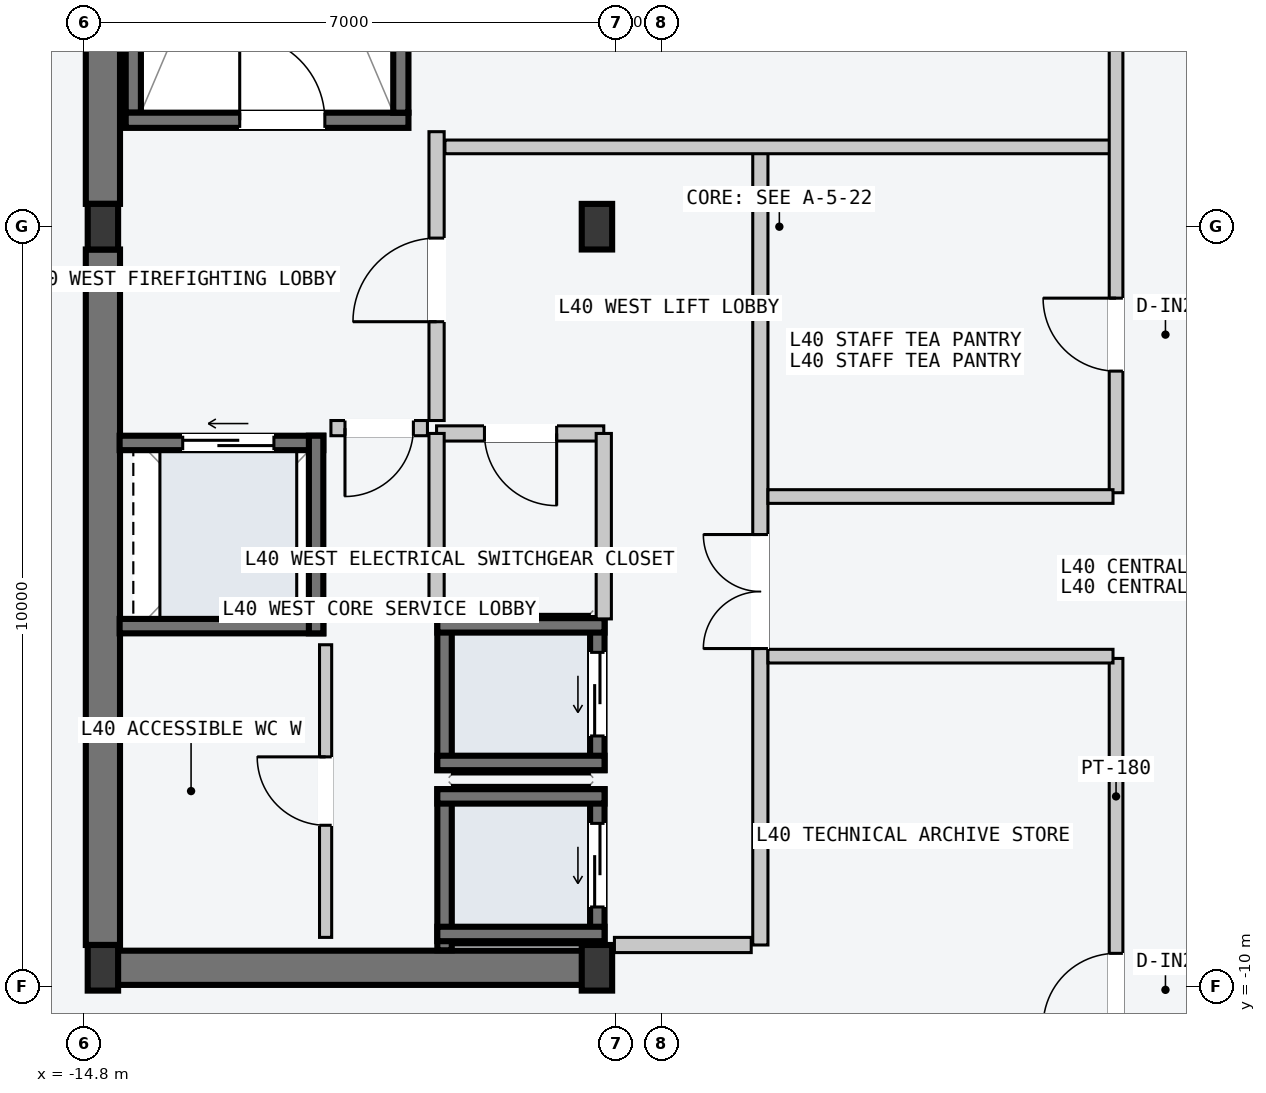
"""IFC4 building model, lengths in metres.
Left out: names, types, materials, properties, quantities, classifications, styles, units other than length and angle.
Written with IfcOpenShell. Run it as: python <this file> out.ifc"""

import sys

from ifc_helpers import new_model, si_unit, direction, frame, frame_2d, origin, origin_2d, place, context, subcontext, project, spatial, rectangle, i_section, extrude, element, fill, save


model = new_model("IFC4")
c1 = context("Model", 3, precision=1e-05, world=origin(), true_north=direction((0.0, 1.0)))
c2 = subcontext(c1, "Body", "Model", "MODEL_VIEW")
j1 = project(units=[si_unit("LENGTHUNIT", "METRE"), si_unit("PLANEANGLEUNIT", "RADIAN")], contexts=[c1])
p1 = place(None, origin())
s1 = spatial("IfcSite", under=j1, at=p1, CompositionType="ELEMENT")
p2 = place(p1, origin())
s2 = spatial("IfcBuilding", under=s1, at=p2, CompositionType="ELEMENT")
p3 = place(p2, frame((0.0, 0.0, 155.1)))
s3 = spatial("IfcBuildingStorey", under=s2, at=p3, CompositionType="ELEMENT", Elevation=155.1)
p4 = place(p3, frame((-14.53, -9.75, -0.2), z_axis=(0.0, 0.0, 1.0), x_axis=(1.0, 0.0, 0.0)))
e1 = element("IfcWall", 1, at=p4, inside=s3, PredefinedType="SHEAR", context=c2, shape_type="SweptSolid", body=[
    extrude(rectangle(XDim=6.46, YDim=0.45, at=frame_2d((3.23, 0.0))), origin(), (0.0, 0.0, 1.0), 3.6),
])
for number, where, z_axis, x_axis in (
    (2, (-14.55, -9.45, -0.2), (0.0, 0.0, 1.0), (0.0, 1.0, 0.0)),
    (3, (-14.55, 0.3, -0.2), (0.0, 0.0, 1.0), (0.0, 1.0, 0.0)),
):
    element("IfcWall", number, at=place(p3, frame(where, z_axis=z_axis, x_axis=x_axis)), inside=s3, PredefinedType="SHEAR", context=c2, shape_type="SweptSolid", body=[
        extrude(rectangle(XDim=9.15, YDim=0.45, at=frame_2d((4.575, 0.0))), origin(), (0.0, 0.0, 1.0), 3.6),
    ])
p5 = place(p3, frame((-14.15, 1.5, -0.2), z_axis=(0.0, 0.0, 1.0), x_axis=(0.0, 1.0, 0.0)))
e4 = element("IfcWall", 4, at=p5, inside=s3, PredefinedType="SOLIDWALL", context=c2, shape_type="SweptSolid", body=[
    extrude(rectangle(XDim=7.8, YDim=0.2, at=frame_2d((3.9, 0.0))), origin(), (0.0, 0.0, 1.0), 3.6),
])
p6 = place(p3, frame((-14.25, 1.4, -0.2), z_axis=(0.0, 0.0, 1.0), x_axis=(1.0, 0.0, 0.0)))
e5 = element("IfcWall", 5, at=p6, inside=s3, PredefinedType="SOLIDWALL", context=c2, shape_type="SweptSolid", body=[
    extrude(rectangle(XDim=3.72, YDim=0.2, at=frame_2d((1.86, 0.0))), origin(), (0.0, 0.0, 1.0), 3.6),
])
p7 = place(p6, frame((1.5, 0.0, 0.2)))
e6 = element("IfcOpeningElement", 6, at=p7, cuts=e5, PredefinedType="OPENING", context=c2, shape_type="SweptSolid", body=[
    extrude(rectangle(XDim=1.12, YDim=2.18, at=frame_2d((0.56, 1.09))), frame((0.0, 0.11, 0.0), z_axis=(0.0, -1.0, 0.0), x_axis=(1.0, 0.0, 0.0)), (0.0, 0.0, 1.0), 0.22),
])
p8 = place(p3, frame((-10.63, 1.5, -0.2), z_axis=(0.0, 0.0, 1.0), x_axis=(0.0, 1.0, 0.0)))
e7 = element("IfcWall", 7, at=p8, inside=s3, PredefinedType="SOLIDWALL", context=c2, shape_type="SweptSolid", body=[
    extrude(rectangle(XDim=7.8, YDim=0.2, at=frame_2d((3.9, 0.0))), origin(), (0.0, 0.0, 1.0), 3.6),
])
for number, where, z_axis, x_axis in (
    (8, (-14.55, -9.75, 0.0), (0.0, 0.0, 1.0), (1.0, 0.0, 0.0)),
    (9, (-14.55, 0.0, 0.0), (0.0, 0.0, 1.0), (1.0, 0.0, 0.0)),
    (10, (-8.05, -9.75, 0.0), (0.0, 0.0, 1.0), (1.0, 0.0, 0.0)),
    (11, (-8.05, 0.0, 0.0), (0.0, 0.0, 1.0), (1.0, 0.0, 0.0)),
):
    element("IfcColumn", number, at=place(p3, frame(where, z_axis=z_axis, x_axis=x_axis)), inside=s3, PredefinedType="COLUMN", context=c2, shape_type="SweptSolid", body=[
        extrude(i_section(OverallWidth=0.4, OverallDepth=0.6, WebThickness=0.022, FlangeThickness=0.036, at=origin_2d()), origin(), (0.0, 0.0, 1.0), 3.6),
    ])
p9 = place(p3, frame((-8.045, -9.52, -0.2), z_axis=(0.0, 0.0, 1.0), x_axis=(0.0, 1.0, 0.0)))
e12 = element("IfcWall", 12, at=p9, inside=s3, PredefinedType="SOLIDWALL", context=c2, shape_type="SweptSolid", body=[
    extrude(rectangle(XDim=2.12, YDim=0.19, at=frame_2d((1.06, 0.0))), origin(), (0.0, 0.0, 1.0), 3.6),
])
p10 = place(p9, frame((0.57, 0.0, 0.2)))
e13 = element("IfcOpeningElement", 13, at=p10, cuts=e12, PredefinedType="OPENING", context=c2, shape_type="SweptSolid", body=[
    extrude(rectangle(XDim=1.1, YDim=2.2, at=frame_2d((0.55, 1.1))), frame((0.0, 0.105, 0.0), z_axis=(0.0, -1.0, 0.0), x_axis=(1.0, 0.0, 0.0)), (0.0, 0.0, 1.0), 0.21),
])
p11 = place(p3, frame((-10.055, -9.52, -0.2), z_axis=(0.0, 0.0, 1.0), x_axis=(0.0, 1.0, 0.0)))
e14 = element("IfcWall", 14, at=p11, inside=s3, PredefinedType="SOLIDWALL", context=c2, shape_type="SweptSolid", body=[
    extrude(rectangle(XDim=2.12, YDim=0.19, at=frame_2d((1.06, 0.0))), origin(), (0.0, 0.0, 1.0), 3.6),
])
for number, where, z_axis, x_axis in (
    (15, (-10.15, -7.495, -0.2), (0.0, 0.0, 1.0), (1.0, 0.0, 0.0)),
    (16, (-10.15, -9.305, -0.2), (0.0, 0.0, 1.0), (1.0, 0.0, 0.0)),
):
    element("IfcWall", number, at=place(p3, frame(where, z_axis=z_axis, x_axis=x_axis)), inside=s3, PredefinedType="SOLIDWALL", context=c2, shape_type="SweptSolid", body=[
        extrude(rectangle(XDim=2.2, YDim=0.19, at=frame_2d((1.1, 0.0))), origin(), (0.0, 0.0, 1.0), 3.6),
    ])
p12 = place(p3, frame((-8.045, -7.15, -0.2), z_axis=(0.0, 0.0, 1.0), x_axis=(0.0, 1.0, 0.0)))
e17 = element("IfcWall", 17, at=p12, inside=s3, PredefinedType="SOLIDWALL", context=c2, shape_type="SweptSolid", body=[
    extrude(rectangle(XDim=2.0, YDim=0.19, at=frame_2d((1.0, 0.0))), origin(), (0.0, 0.0, 1.0), 3.6),
])
p13 = place(p12, frame((0.45, 0.0, 0.2)))
e18 = element("IfcOpeningElement", 18, at=p13, cuts=e17, PredefinedType="OPENING", context=c2, shape_type="SweptSolid", body=[
    extrude(rectangle(XDim=1.1, YDim=2.2, at=frame_2d((0.55, 1.1))), frame((0.0, 0.105, 0.0), z_axis=(0.0, -1.0, 0.0), x_axis=(1.0, 0.0, 0.0)), (0.0, 0.0, 1.0), 0.21),
])
p14 = place(p3, frame((-10.055, -7.15, -0.2), z_axis=(0.0, 0.0, 1.0), x_axis=(0.0, 1.0, 0.0)))
e19 = element("IfcWall", 19, at=p14, inside=s3, PredefinedType="SOLIDWALL", context=c2, shape_type="SweptSolid", body=[
    extrude(rectangle(XDim=2.0, YDim=0.19, at=frame_2d((1.0, 0.0))), origin(), (0.0, 0.0, 1.0), 3.6),
])
for number, where, z_axis, x_axis in (
    (20, (-10.15, -5.245, -0.2), (0.0, 0.0, 1.0), (1.0, 0.0, 0.0)),
    (21, (-10.15, -7.055, -0.2), (0.0, 0.0, 1.0), (1.0, 0.0, 0.0)),
):
    element("IfcWall", number, at=place(p3, frame(where, z_axis=z_axis, x_axis=x_axis)), inside=s3, PredefinedType="SOLIDWALL", context=c2, shape_type="SweptSolid", body=[
        extrude(rectangle(XDim=2.2, YDim=0.19, at=frame_2d((1.1, 0.0))), origin(), (0.0, 0.0, 1.0), 3.6),
    ])
p15 = place(p3, frame((-14.33, -2.845, -0.2), z_axis=(0.0, 0.0, 1.0), x_axis=(1.0, 0.0, 0.0)))
e22 = element("IfcWall", 22, at=p15, inside=s3, PredefinedType="SOLIDWALL", context=c2, shape_type="SweptSolid", body=[
    extrude(rectangle(XDim=2.68, YDim=0.19, at=frame_2d((1.34, 0.0))), origin(), (0.0, 0.0, 1.0), 3.6),
])
p16 = place(p15, frame((0.83, 0.0, 0.2)))
e23 = element("IfcOpeningElement", 23, at=p16, cuts=e22, PredefinedType="OPENING", context=c2, shape_type="SweptSolid", body=[
    extrude(rectangle(XDim=1.2, YDim=2.2, at=frame_2d((0.6, 1.1))), frame((0.0, 0.105, 0.0), z_axis=(0.0, -1.0, 0.0), x_axis=(1.0, 0.0, 0.0)), (0.0, 0.0, 1.0), 0.21),
])
p17 = place(p3, frame((-14.33, -5.255, -0.2), z_axis=(0.0, 0.0, 1.0), x_axis=(1.0, 0.0, 0.0)))
e24 = element("IfcWall", 24, at=p17, inside=s3, PredefinedType="SOLIDWALL", context=c2, shape_type="SweptSolid", body=[
    extrude(rectangle(XDim=2.68, YDim=0.19, at=frame_2d((1.34, 0.0))), origin(), (0.0, 0.0, 1.0), 3.6),
])
p18 = place(p3, frame((-11.745, -5.35, -0.2), z_axis=(0.0, 0.0, 1.0), x_axis=(0.0, 1.0, 0.0)))
e25 = element("IfcWall", 25, at=p18, inside=s3, PredefinedType="SOLIDWALL", context=c2, shape_type="SweptSolid", body=[
    extrude(rectangle(XDim=2.6, YDim=0.19, at=frame_2d((1.3, 0.0))), origin(), (0.0, 0.0, 1.0), 3.6),
])
p19 = place(p3, frame((-5.9, -9.45, 0.0), z_axis=(0.0, 0.0, 1.0), x_axis=(0.0, 1.0, 0.0)))
e26 = element("IfcWall", 26, at=p19, inside=s3, PredefinedType="PARTITIONING", context=c2, shape_type="SweptSolid", body=[
    extrude(rectangle(XDim=10.5, YDim=0.2, at=frame_2d((5.25, 0.0))), origin(), (0.0, 0.0, 1.0), 3.4),
])
p20 = place(p19, frame((3.9, 0.0, 0.0)))
e27 = element("IfcOpeningElement", 27, at=p20, cuts=e26, PredefinedType="OPENING", context=c2, shape_type="SweptSolid", body=[
    extrude(rectangle(XDim=1.5, YDim=2.2, at=frame_2d((0.75, 1.1))), frame((0.0, 0.11, 0.0), z_axis=(0.0, -1.0, 0.0), x_axis=(1.0, 0.0, 0.0)), (0.0, 0.0, 1.0), 0.22),
])
p21 = place(p3, frame((-6.02, -9.45, 0.0), z_axis=(0.0, 0.0, 1.0), x_axis=(-1.0, 0.0, 0.0)))
e28 = element("IfcWall", 28, at=p21, inside=s3, PredefinedType="PARTITIONING", context=c2, shape_type="SweptSolid", body=[
    extrude(rectangle(XDim=1.8, YDim=0.2, at=frame_2d((0.9, 0.0))), origin(), (0.0, 0.0, 1.0), 3.4),
])
p22 = place(p3, frame((-10.16, -2.55, 0.0), z_axis=(0.0, 0.0, 1.0), x_axis=(0.0, 1.0, 0.0)))
e29 = element("IfcWall", 29, at=p22, inside=s3, PredefinedType="PARTITIONING", context=c2, shape_type="SweptSolid", body=[
    extrude(rectangle(XDim=3.8, YDim=0.2, at=frame_2d((1.9, 0.0))), origin(), (0.0, 0.0, 1.0), 3.4),
])
p23 = place(p22, frame((1.3, 0.0, 0.0)))
e30 = element("IfcOpeningElement", 30, at=p23, cuts=e29, PredefinedType="OPENING", context=c2, shape_type="SweptSolid", body=[
    extrude(rectangle(XDim=1.1, YDim=2.15, at=frame_2d((0.55, 1.075))), frame((0.0, 0.11, 0.0), z_axis=(0.0, -1.0, 0.0), x_axis=(1.0, 0.0, 0.0)), (0.0, 0.0, 1.0), 0.22),
])
p24 = place(p3, frame((-10.28, -2.65, 0.0), z_axis=(0.0, 0.0, 1.0), x_axis=(-1.0, 0.0, 0.0)))
e31 = element("IfcWall", 31, at=p24, inside=s3, PredefinedType="PARTITIONING", context=c2, shape_type="SweptSolid", body=[
    extrude(rectangle(XDim=1.27, YDim=0.2, at=frame_2d((0.635, 0.0))), origin(), (0.0, 0.0, 1.0), 3.4),
])
p25 = place(p24, frame((0.185, 0.0, 0.0)))
e32 = element("IfcOpeningElement", 32, at=p25, cuts=e31, PredefinedType="OPENING", context=c2, shape_type="SweptSolid", body=[
    extrude(rectangle(XDim=0.9, YDim=2.15, at=frame_2d((0.45, 1.075))), frame((0.0, 0.11, 0.0), z_axis=(0.0, -1.0, 0.0), x_axis=(1.0, 0.0, 0.0)), (0.0, 0.0, 1.0), 0.22),
])
p26 = place(p3, frame((-7.96, -2.72, 0.0), z_axis=(0.0, 0.0, 1.0), x_axis=(-1.0, 0.0, 0.0)))
e33 = element("IfcWall", 33, at=p26, inside=s3, PredefinedType="PARTITIONING", context=c2, shape_type="SweptSolid", body=[
    extrude(rectangle(XDim=2.2, YDim=0.2, at=frame_2d((1.1, 0.0))), origin(), (0.0, 0.0, 1.0), 3.4),
])
p27 = place(p26, frame((0.62, 0.0, 0.0)))
e34 = element("IfcOpeningElement", 34, at=p27, cuts=e33, PredefinedType="OPENING", context=c2, shape_type="SweptSolid", body=[
    extrude(rectangle(XDim=0.95, YDim=2.1, at=frame_2d((0.475, 1.05))), frame((0.0, 0.11, 0.0), z_axis=(0.0, -1.0, 0.0), x_axis=(1.0, 0.0, 0.0)), (0.0, 0.0, 1.0), 0.22),
])
for number, where, z_axis, x_axis in (
    (35, (-7.96, -5.16, 0.0), (0.0, 0.0, 1.0), (0.0, 1.0, 0.0)),
    (36, (-10.16, -5.16, 0.0), (0.0, 0.0, 1.0), (0.0, 1.0, 0.0)),
):
    element("IfcWall", number, at=place(p3, frame(where, z_axis=z_axis, x_axis=x_axis)), inside=s3, PredefinedType="PARTITIONING", context=c2, shape_type="SweptSolid", body=[
        extrude(rectangle(XDim=2.44, YDim=0.2, at=frame_2d((1.22, 0.0))), origin(), (0.0, 0.0, 1.0), 3.4),
    ])
p28 = place(p3, frame((-11.62, -9.35, 0.0), z_axis=(0.0, 0.0, 1.0), x_axis=(0.0, 1.0, 0.0)))
e37 = element("IfcWall", 37, at=p28, inside=s3, PredefinedType="PARTITIONING", context=c2, shape_type="SweptSolid", body=[
    extrude(rectangle(XDim=3.85, YDim=0.16, at=frame_2d((1.925, 0.0))), origin(), (0.0, 0.0, 1.0), 3.4),
])
p29 = place(p28, frame((1.475, 0.0, 0.0)))
e38 = element("IfcOpeningElement", 38, at=p29, cuts=e37, PredefinedType="OPENING", context=c2, shape_type="SweptSolid", body=[
    extrude(rectangle(XDim=0.9, YDim=2.15, at=frame_2d((0.45, 1.075))), frame((0.0, 0.09, 0.0), z_axis=(0.0, -1.0, 0.0), x_axis=(1.0, 0.0, 0.0)), (0.0, 0.0, 1.0), 0.18),
])
p30 = place(p3, frame((-10.05, 1.05, 0.0), z_axis=(0.0, 0.0, 1.0), x_axis=(1.0, 0.0, 0.0)))
e39 = element("IfcWall", 39, at=p30, inside=s3, PredefinedType="PARTITIONING", context=c2, shape_type="SweptSolid", body=[
    extrude(rectangle(XDim=8.79, YDim=0.18, at=frame_2d((4.395, 0.0))), origin(), (0.0, 0.0, 1.0), 3.4),
])
p31 = place(p3, frame((-1.22, -3.5, 0.0), z_axis=(0.0, 0.0, 1.0), x_axis=(0.0, 1.0, 0.0)))
e40 = element("IfcWall", 40, at=p31, inside=s3, PredefinedType="PARTITIONING", context=c2, shape_type="SweptSolid", body=[
    extrude(rectangle(XDim=13.51, YDim=0.18, at=frame_2d((6.755, 0.0))), origin(), (0.0, 0.0, 1.0), 3.4),
])
p32 = place(p31, frame((6.1, 0.0, 0.0)))
e41 = element("IfcOpeningElement", 41, at=p32, cuts=e40, PredefinedType="OPENING", context=c2, shape_type="SweptSolid", body=[
    extrude(rectangle(XDim=1.24, YDim=2.24, at=frame_2d((0.62, 1.12))), frame((0.0, 0.1, 0.0), z_axis=(0.0, -1.0, 0.0), x_axis=(1.0, 0.0, 0.0)), (0.0, 0.0, 1.0), 0.2),
])
p33 = place(p31, frame((1.6, 0.0, 0.0)))
e42 = element("IfcOpeningElement", 42, at=p33, cuts=e40, PredefinedType="OPENING", context=c2, shape_type="SweptSolid", body=[
    extrude(rectangle(XDim=0.96, YDim=2.18, at=frame_2d((0.48, 1.09))), frame((0.0, 0.1, 0.0), z_axis=(0.0, -1.0, 0.0), x_axis=(1.0, 0.0, 0.0)), (0.0, 0.0, 1.0), 0.2),
])
p34 = place(p3, frame((-5.8, -3.55, 0.0), z_axis=(0.0, 0.0, 1.0), x_axis=(1.0, 0.0, 0.0)))
e43 = element("IfcWall", 43, at=p34, inside=s3, PredefinedType="PARTITIONING", context=c2, shape_type="SweptSolid", body=[
    extrude(rectangle(XDim=4.54, YDim=0.18, at=frame_2d((2.27, 0.0))), origin(), (0.0, 0.0, 1.0), 3.4),
])
p35 = place(p3, frame((-1.22, -11.67, 0.0), z_axis=(0.0, 0.0, 1.0), x_axis=(0.0, 1.0, 0.0)))
e44 = element("IfcWall", 44, at=p35, inside=s3, PredefinedType="PARTITIONING", context=c2, shape_type="SweptSolid", body=[
    extrude(rectangle(XDim=5.99, YDim=0.18, at=frame_2d((2.995, 0.0))), origin(), (0.0, 0.0, 1.0), 3.4),
])
p36 = place(p35, frame((1.15, 0.0, 0.0)))
e45 = element("IfcOpeningElement", 45, at=p36, cuts=e44, PredefinedType="OPENING", context=c2, shape_type="SweptSolid", body=[
    extrude(rectangle(XDim=0.96, YDim=2.18, at=frame_2d((0.48, 1.09))), frame((0.0, 0.1, 0.0), z_axis=(0.0, -1.0, 0.0), x_axis=(1.0, 0.0, 0.0)), (0.0, 0.0, 1.0), 0.2),
])
p37 = place(p3, frame((-5.8, -5.65, 0.0), z_axis=(0.0, 0.0, 1.0), x_axis=(1.0, 0.0, 0.0)))
e46 = element("IfcWall", 46, at=p37, inside=s3, PredefinedType="PARTITIONING", context=c2, shape_type="SweptSolid", body=[
    extrude(rectangle(XDim=4.54, YDim=0.18, at=frame_2d((2.27, 0.0))), origin(), (0.0, 0.0, 1.0), 3.4),
])
p38 = place(p7, origin())
e47 = element("IfcDoor", 47, at=p38, inside=s3, OperationType="SINGLE_SWING_LEFT", PredefinedType="DOOR", context=c2, shape_type="SweptSolid", body=[
    extrude(rectangle(XDim=1.12, YDim=2.18, at=frame_2d((0.56, 1.09))), frame((0.0, 0.025, 0.0), z_axis=(0.0, -1.0, 0.0), x_axis=(1.0, 0.0, 0.0)), (0.0, 0.0, 1.0), 0.05),
])
fill(e6, e47)
p39 = place(p10, origin())
e48 = element("IfcDoor", 48, at=p39, inside=s3, OperationType="SLIDING_TO_LEFT", PredefinedType="DOOR", context=c2, shape_type="SweptSolid", body=[
    extrude(rectangle(XDim=1.1, YDim=2.2, at=frame_2d((0.55, 1.1))), frame((0.0, 0.025, 0.0), z_axis=(0.0, -1.0, 0.0), x_axis=(1.0, 0.0, 0.0)), (0.0, 0.0, 1.0), 0.05),
])
fill(e13, e48)
p40 = place(p13, origin())
e49 = element("IfcDoor", 49, at=p40, inside=s3, OperationType="SLIDING_TO_LEFT", PredefinedType="DOOR", context=c2, shape_type="SweptSolid", body=[
    extrude(rectangle(XDim=1.1, YDim=2.2, at=frame_2d((0.55, 1.1))), frame((0.0, 0.025, 0.0), z_axis=(0.0, -1.0, 0.0), x_axis=(1.0, 0.0, 0.0)), (0.0, 0.0, 1.0), 0.05),
])
fill(e18, e49)
p41 = place(p16, origin())
e50 = element("IfcDoor", 50, at=p41, inside=s3, OperationType="SLIDING_TO_LEFT", PredefinedType="DOOR", context=c2, shape_type="SweptSolid", body=[
    extrude(rectangle(XDim=1.2, YDim=2.2, at=frame_2d((0.6, 1.1))), frame((0.0, 0.025, 0.0), z_axis=(0.0, -1.0, 0.0), x_axis=(1.0, 0.0, 0.0)), (0.0, 0.0, 1.0), 0.05),
])
fill(e23, e50)
p42 = place(p20, origin())
e51 = element("IfcDoor", 51, at=p42, inside=s3, OperationType="DOUBLE_DOOR_SINGLE_SWING", PredefinedType="DOOR", context=c2, shape_type="SweptSolid", body=[
    extrude(rectangle(XDim=1.5, YDim=2.2, at=frame_2d((0.75, 1.1))), frame((0.0, 0.025, 0.0), z_axis=(0.0, -1.0, 0.0), x_axis=(1.0, 0.0, 0.0)), (0.0, 0.0, 1.0), 0.05),
])
fill(e27, e51)
p43 = place(p23, origin())
e52 = element("IfcDoor", 52, at=p43, inside=s3, OperationType="SINGLE_SWING_LEFT", PredefinedType="DOOR", context=c2, shape_type="SweptSolid", body=[
    extrude(rectangle(XDim=1.1, YDim=2.15, at=frame_2d((0.55, 1.075))), frame((0.0, 0.025, 0.0), z_axis=(0.0, -1.0, 0.0), x_axis=(1.0, 0.0, 0.0)), (0.0, 0.0, 1.0), 0.05),
])
fill(e30, e52)
p44 = place(p25, origin())
e53 = element("IfcDoor", 53, at=p44, inside=s3, OperationType="SINGLE_SWING_RIGHT", PredefinedType="DOOR", context=c2, shape_type="SweptSolid", body=[
    extrude(rectangle(XDim=0.9, YDim=2.15, at=frame_2d((0.45, 1.075))), frame((0.0, 0.025, 0.0), z_axis=(0.0, -1.0, 0.0), x_axis=(1.0, 0.0, 0.0)), (0.0, 0.0, 1.0), 0.05),
])
fill(e32, e53)
p45 = place(p27, origin())
e54 = element("IfcDoor", 54, at=p45, inside=s3, OperationType="SINGLE_SWING_LEFT", PredefinedType="DOOR", context=c2, shape_type="SweptSolid", body=[
    extrude(rectangle(XDim=0.95, YDim=2.1, at=frame_2d((0.475, 1.05))), frame((0.0, 0.025, 0.0), z_axis=(0.0, -1.0, 0.0), x_axis=(1.0, 0.0, 0.0)), (0.0, 0.0, 1.0), 0.05),
])
fill(e34, e54)
p46 = place(p29, origin())
e55 = element("IfcDoor", 55, at=p46, inside=s3, OperationType="SINGLE_SWING_RIGHT", PredefinedType="DOOR", context=c2, shape_type="SweptSolid", body=[
    extrude(rectangle(XDim=0.9, YDim=2.15, at=frame_2d((0.45, 1.075))), frame((0.0, 0.025, 0.0), z_axis=(0.0, -1.0, 0.0), x_axis=(1.0, 0.0, 0.0)), (0.0, 0.0, 1.0), 0.05),
])
fill(e38, e55)
p47 = place(p33, origin())
e56 = element("IfcDoor", 56, at=p47, inside=s3, OperationType="SINGLE_SWING_RIGHT", PredefinedType="DOOR", context=c2, shape_type="SweptSolid", body=[
    extrude(rectangle(XDim=0.96, YDim=2.18, at=frame_2d((0.48, 1.09))), frame((0.0, 0.025, 0.0), z_axis=(0.0, -1.0, 0.0), x_axis=(1.0, 0.0, 0.0)), (0.0, 0.0, 1.0), 0.05),
])
fill(e42, e56)
p48 = place(p36, origin())
e57 = element("IfcDoor", 57, at=p48, inside=s3, OperationType="SINGLE_SWING_LEFT", PredefinedType="DOOR", context=c2, shape_type="SweptSolid", body=[
    extrude(rectangle(XDim=0.96, YDim=2.18, at=frame_2d((0.48, 1.09))), frame((0.0, 0.025, 0.0), z_axis=(0.0, -1.0, 0.0), x_axis=(1.0, 0.0, 0.0)), (0.0, 0.0, 1.0), 0.05),
])
fill(e45, e57)
save(model, sys.argv[1])
